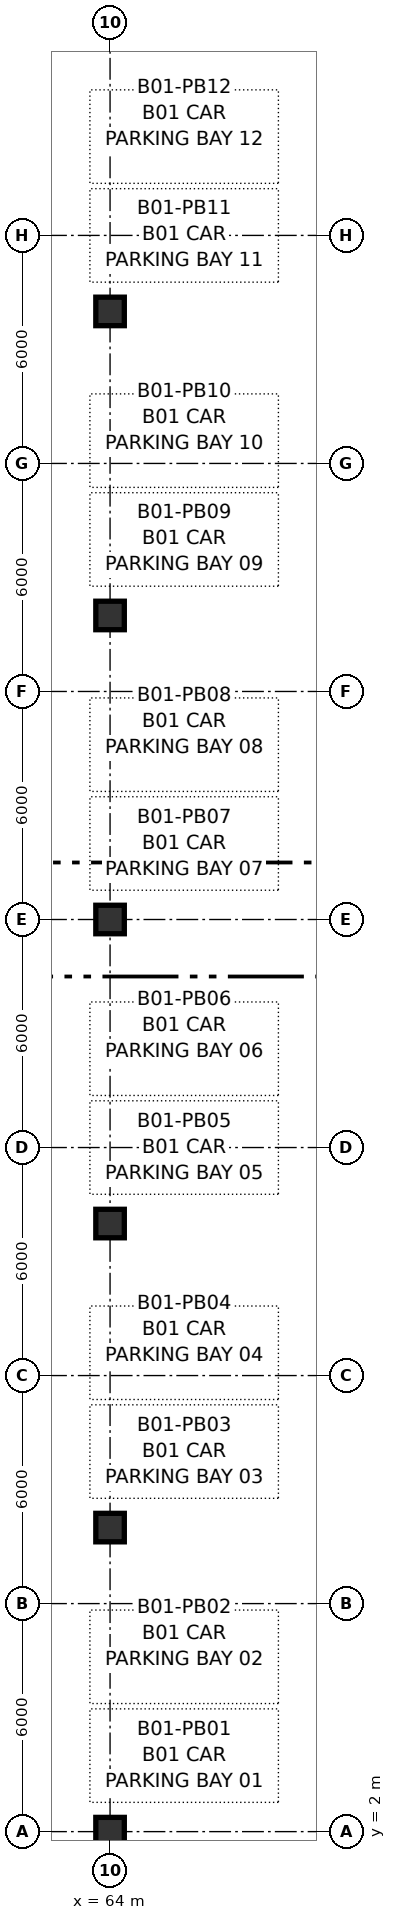
"""IFC4 building model, lengths in metres.
Left out: names, types, materials, properties, quantities, classifications, styles, units other than length and angle.
Written with IfcOpenShell. Run it as: python <this file> out.ifc"""

import sys

from ifc_helpers import new_model, si_unit, direction, frame, origin, origin_2d, place, context, subcontext, project, spatial, rectangle, extrude, source, transform, mapped, element, save


model = new_model("IFC4")
c1 = context("Model", 3, precision=1e-05, world=origin(), true_north=direction((0.0, 1.0)))
c2 = subcontext(c1, "Body", "Model", "MODEL_VIEW")
j1 = project(units=[si_unit("LENGTHUNIT", "METRE"), si_unit("PLANEANGLEUNIT", "RADIAN")], contexts=[c1])
p1 = place(None, origin())
s1 = spatial("IfcSite", under=j1, at=p1, CompositionType="ELEMENT")
p2 = place(p1, origin())
s2 = spatial("IfcBuilding", under=s1, at=p2, CompositionType="ELEMENT")
p3 = place(p2, frame((0.0, 0.0, -4.2)))
s3 = spatial("IfcBuildingStorey", under=s2, at=p3, CompositionType="ELEMENT", Elevation=-4.2)
m1 = source(origin(), c2, "Body", "SweptSolid", [
    extrude(rectangle(XDim=0.75, YDim=0.75, at=origin_2d()), origin(), (0.0, 0.0, 1.0), 3.985),
])
for number, where, z_axis, x_axis in (
    (1, (64.0, 2.0, 0.0), (0.0, 0.0, 1.0), (1.0, 0.0, 0.0)),
    (2, (64.0, 10.0, 0.0), (0.0, 0.0, 1.0), (1.0, 0.0, 0.0)),
    (3, (64.0, 18.0, 0.0), (0.0, 0.0, 1.0), (1.0, 0.0, 0.0)),
    (4, (64.0, 26.0, 0.0), (0.0, 0.0, 1.0), (1.0, 0.0, 0.0)),
    (5, (64.0, 34.0, 0.0), (0.0, 0.0, 1.0), (1.0, 0.0, 0.0)),
    (6, (64.0, 42.0, 0.0), (0.0, 0.0, 1.0), (1.0, 0.0, 0.0)),
):
    element("IfcColumn", number, at=place(p3, frame(where, z_axis=z_axis, x_axis=x_axis)), inside=s3, PredefinedType="COLUMN", context=c2, shape_type="MappedRepresentation", body=[
        mapped(m1, transform((0.0, 0.0, 0.0), x_axis=(1.0, 0.0, 0.0), y_axis=(0.0, 1.0, 0.0), z_axis=(0.0, 0.0, 1.0), scale=1.0)),
    ])
save(model, sys.argv[1])
